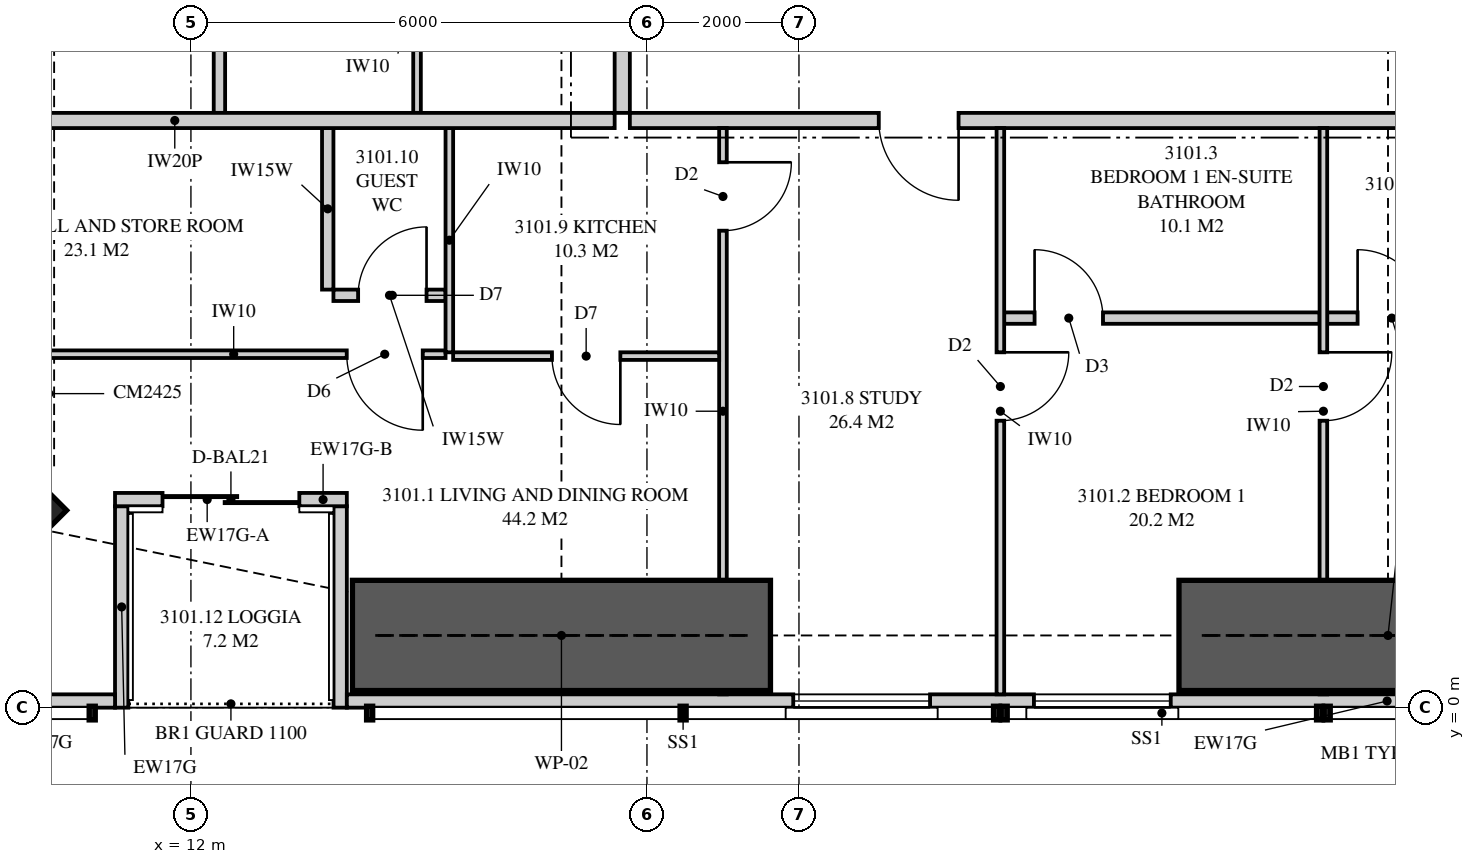
"""IFC4 building model, lengths in metres.
Left out: names, types, materials, properties, quantities, classifications, styles, units other than length and angle.
Written with IfcOpenShell. Run it as: python <this file> out.ifc"""

import sys

from ifc_helpers import new_model, si_unit, direction, frame, frame_2d, origin, origin_2d, place, context, subcontext, project, spatial, polyline, rectangle, outline, extrude, element, fill, save


model = new_model("IFC4")
c1 = context("Model", 3, precision=1e-05, world=origin(), true_north=direction((0.0, 1.0)))
c2 = subcontext(c1, "Body", "Model", "MODEL_VIEW")
j1 = project(units=[si_unit("LENGTHUNIT", "METRE"), si_unit("PLANEANGLEUNIT", "RADIAN")], contexts=[c1])
p1 = place(None, origin())
s1 = spatial("IfcSite", under=j1, at=p1, CompositionType="ELEMENT")
p2 = place(p1, origin())
s2 = spatial("IfcBuilding", under=s1, at=p2, CompositionType="ELEMENT")
p3 = place(p2, frame((0.0, 0.0, 114.9)))
s3 = spatial("IfcBuildingStorey", under=s2, at=p3, CompositionType="ELEMENT", Elevation=114.9)
p4 = place(p3, frame((8.631, 2.631, 0.0), z_axis=(0.0, 0.0, 1.0), x_axis=(0.707106781187, 0.707106781187, 0.0)))
e1 = element("IfcColumn", 1, at=p4, inside=s3, PredefinedType="COLUMN", context=c2, shape_type="SweptSolid", body=[
    extrude(rectangle(XDim=2.4, YDim=2.5, at=origin_2d()), origin(), (0.0, 0.0, 1.0), 3.35),
])
p5 = place(p3, frame((9.051, 0.087, 0.0), z_axis=(0.0, 0.0, 1.0), x_axis=(1.0, 0.0, 0.0)))
e2 = element("IfcWall", 2, at=p5, inside=s3, PredefinedType="SOLIDWALL", context=c2, shape_type="SweptSolid", body=[
    extrude(rectangle(XDim=1.95, YDim=0.175, at=frame_2d((0.975, 0.0))), origin(), (0.0, 0.0, 1.0), 3.11),
])
p6 = place(p3, frame((14.051, 0.087, 0.0), z_axis=(0.0, 0.0, 1.0), x_axis=(1.0, 0.0, 0.0)))
e3 = element("IfcWall", 3, at=p6, inside=s3, PredefinedType="SOLIDWALL", context=c2, shape_type="SweptSolid", body=[
    extrude(outline(polyline([(0.0, 0.0), (27.374, 0.0), (27.374, 3.11), (24.777, 3.11), (24.777, 2.15), (24.732, 2.15), (24.732, 3.11), (24.574, 3.11), (24.574, 2.15), (2.824, 2.15), (2.824, 3.11), (2.666, 3.11), (2.666, 2.15), (2.62, 2.15), (2.62, 3.11), (0.0, 3.11), (0.0, 0.0)])), frame((0.0, 0.087, 0.0), z_axis=(0.0, -1.0, 0.0), x_axis=(1.0, 0.0, 0.0)), (0.0, 0.0, 1.0), 0.175),
])
p7 = place(p6, frame((5.874, 0.0, 0.4)))
e4 = element("IfcOpeningElement", 4, at=p7, cuts=e3, PredefinedType="OPENING", context=c2, shape_type="SweptSolid", body=[
    extrude(rectangle(XDim=1.8, YDim=1.7, at=frame_2d((0.9, 0.85))), frame((0.0, 0.097, 0.0), z_axis=(0.0, -1.0, 0.0), x_axis=(1.0, 0.0, 0.0)), (0.0, 0.0, 1.0), 0.195),
])
p8 = place(p6, frame((9.04, 0.0, 0.4)))
e5 = element("IfcOpeningElement", 5, at=p8, cuts=e3, PredefinedType="OPENING", context=c2, shape_type="SweptSolid", body=[
    extrude(rectangle(XDim=1.8, YDim=1.7, at=frame_2d((0.9, 0.85))), frame((0.0, 0.097, 0.0), z_axis=(0.0, -1.0, 0.0), x_axis=(1.0, 0.0, 0.0)), (0.0, 0.0, 1.0), 0.195),
])
p9 = place(p6, frame((16.564, 0.0, 0.4)))
e6 = element("IfcOpeningElement", 6, at=p9, cuts=e3, PredefinedType="OPENING", context=c2, shape_type="SweptSolid", body=[
    extrude(rectangle(XDim=1.8, YDim=1.7, at=frame_2d((0.9, 0.85))), frame((0.0, 0.097, 0.0), z_axis=(0.0, -1.0, 0.0), x_axis=(1.0, 0.0, 0.0)), (0.0, 0.0, 1.0), 0.195),
])
p10 = place(p6, frame((19.889, 0.0, 0.4)))
e7 = element("IfcOpeningElement", 7, at=p10, cuts=e3, PredefinedType="OPENING", context=c2, shape_type="SweptSolid", body=[
    extrude(rectangle(XDim=1.8, YDim=1.7, at=frame_2d((0.9, 0.85))), frame((0.0, 0.097, 0.0), z_axis=(0.0, -1.0, 0.0), x_axis=(1.0, 0.0, 0.0)), (0.0, 0.0, 1.0), 0.195),
])
p11 = place(p3, frame((11.001, 2.738, 0.0), z_axis=(0.0, 0.0, 1.0), x_axis=(1.0, 0.0, 0.0)))
e8 = element("IfcWall", 8, at=p11, inside=s3, PredefinedType="SOLIDWALL", context=c2, shape_type="SweptSolid", body=[
    extrude(rectangle(XDim=2.425, YDim=0.175, at=frame_2d((1.212, 0.0))), origin(), (0.0, 0.0, 1.0), 2.15),
])
p12 = place(p11, frame((0.625, 0.0, 0.0)))
e9 = element("IfcOpeningElement", 9, at=p12, cuts=e8, PredefinedType="OPENING", context=c2, shape_type="SweptSolid", body=[
    extrude(rectangle(XDim=1.8, YDim=2.1, at=frame_2d((0.9, 1.05))), frame((0.0, 0.097, 0.0), z_axis=(0.0, -1.0, 0.0), x_axis=(1.0, 0.0, 0.0)), (0.0, 0.0, 1.0), 0.195),
])
p13 = place(p3, frame((13.426, 2.738, 0.0), z_axis=(0.0, 0.0, 1.0), x_axis=(1.0, 0.0, 0.0)))
e10 = element("IfcWall", 10, at=p13, inside=s3, PredefinedType="SOLIDWALL", context=c2, shape_type="SweptSolid", body=[
    extrude(rectangle(XDim=0.625, YDim=0.175, at=frame_2d((0.312, 0.0))), origin(), (0.0, 0.0, 1.0), 3.11),
])
p14 = place(p3, frame((11.089, 0.0, 0.0), z_axis=(0.0, 0.0, 1.0), x_axis=(0.0, 1.0, 0.0)))
e11 = element("IfcWall", 11, at=p14, inside=s3, PredefinedType="SOLIDWALL", context=c2, shape_type="SweptSolid", body=[
    extrude(outline(polyline([(0.0, 0.0), (2.65, 0.0), (2.65, 2.15), (1.296, 2.15), (1.296, 3.11), (0.0, 3.11), (0.0, 0.0)])), frame((0.0, 0.087, 0.0), z_axis=(0.0, -1.0, 0.0), x_axis=(1.0, 0.0, 0.0)), (0.0, 0.0, 1.0), 0.175),
])
p15 = place(p3, frame((13.964, 0.0, 0.0), z_axis=(0.0, 0.0, 1.0), x_axis=(0.0, 1.0, 0.0)))
e12 = element("IfcWall", 12, at=p15, inside=s3, PredefinedType="SOLIDWALL", context=c2, shape_type="SweptSolid", body=[
    extrude(outline(polyline([(0.0, 0.0), (2.65, 0.0), (2.65, 3.11), (2.378, 3.11), (2.378, 2.15), (0.709, 2.15), (0.709, 3.11), (0.0, 3.11), (0.0, 0.0)])), frame((0.0, 0.087, 0.0), z_axis=(0.0, -1.0, 0.0), x_axis=(1.0, 0.0, 0.0)), (0.0, 0.0, 1.0), 0.175),
])
p16 = place(p3, frame((17.775, 7.725, 0.0), z_axis=(0.0, 0.0, 1.0), x_axis=(1.0, 0.0, 0.0)))
e13 = element("IfcWall", 13, at=p16, inside=s3, PredefinedType="PARTITIONING", context=c2, shape_type="SweptSolid", body=[
    extrude(outline(polyline([(0.0, 0.0), (19.225, 0.0), (19.225, 3.11), (10.312, 3.11), (10.312, 2.541), (9.638, 2.541), (9.638, 3.11), (0.0, 3.11), (0.0, 0.0)])), frame((0.0, 0.1, 0.0), z_axis=(0.0, -1.0, 0.0), x_axis=(1.0, 0.0, 0.0)), (0.0, 0.0, 1.0), 0.2),
])
p17 = place(p16, frame((3.275, 0.0, 0.0)))
e14 = element("IfcOpeningElement", 14, at=p17, cuts=e13, PredefinedType="OPENING", context=c2, shape_type="SweptSolid", body=[
    extrude(rectangle(XDim=1.05, YDim=2.2, at=frame_2d((0.525, 1.1))), frame((0.0, 0.11, 0.0), z_axis=(0.0, -1.0, 0.0), x_axis=(1.0, 0.0, 0.0)), (0.0, 0.0, 1.0), 0.22),
])
p18 = place(p3, frame((22.65, 0.175, 0.0), z_axis=(0.0, 0.0, 1.0), x_axis=(0.0, 1.0, 0.0)))
e15 = element("IfcWall", 15, at=p18, inside=s3, PredefinedType="PARTITIONING", context=c2, shape_type="SweptSolid", body=[
    extrude(outline(polyline([(0.0, 0.0), (7.45, 0.0), (7.45, 3.11), (1.635, 3.11), (1.635, 2.15), (0.0, 2.15), (0.0, 3.11), (0.0, 0.0)])), frame((0.0, 0.05, 0.0), z_axis=(0.0, -1.0, 0.0), x_axis=(1.0, 0.0, 0.0)), (0.0, 0.0, 1.0), 0.1),
])
p19 = place(p18, frame((3.6, 0.0, 0.0)))
e16 = element("IfcOpeningElement", 16, at=p19, cuts=e15, PredefinedType="OPENING", context=c2, shape_type="SweptSolid", body=[
    extrude(rectangle(XDim=0.9, YDim=2.1, at=frame_2d((0.45, 1.05))), frame((0.0, 0.06, 0.0), z_axis=(0.0, -1.0, 0.0), x_axis=(1.0, 0.0, 0.0)), (0.0, 0.0, 1.0), 0.12),
])
p20 = place(p3, frame((26.9, 0.175, 0.0), z_axis=(0.0, 0.0, 1.0), x_axis=(0.0, 1.0, 0.0)))
e17 = element("IfcWall", 17, at=p20, inside=s3, PredefinedType="PARTITIONING", context=c2, shape_type="SweptSolid", body=[
    extrude(outline(polyline([(0.529, 2.15), (0.0, 2.15), (0.0, 0.0), (0.529, 0.0), (0.529, 0.889), (1.021, 0.889), (1.021, 0.0), (7.45, 0.0), (7.45, 3.11), (1.635, 3.11), (1.635, 2.15), (1.021, 2.15), (1.021, 1.261), (0.529, 1.261), (0.529, 2.15)])), frame((0.0, 0.05, 0.0), z_axis=(0.0, -1.0, 0.0), x_axis=(1.0, 0.0, 0.0)), (0.0, 0.0, 1.0), 0.1),
])
p21 = place(p20, frame((3.6, 0.0, 0.0)))
e18 = element("IfcOpeningElement", 18, at=p21, cuts=e17, PredefinedType="OPENING", context=c2, shape_type="SweptSolid", body=[
    extrude(rectangle(XDim=0.9, YDim=2.1, at=frame_2d((0.45, 1.05))), frame((0.0, 0.06, 0.0), z_axis=(0.0, -1.0, 0.0), x_axis=(1.0, 0.0, 0.0)), (0.0, 0.0, 1.0), 0.12),
])
p22 = place(p3, frame((22.7, 5.125, 0.0), z_axis=(0.0, 0.0, 1.0), x_axis=(1.0, 0.0, 0.0)))
e19 = element("IfcWall", 19, at=p22, inside=s3, PredefinedType="PLUMBINGWALL", context=c2, shape_type="SweptSolid", body=[
    extrude(rectangle(XDim=4.15, YDim=0.15, at=frame_2d((2.075, 0.0))), origin(), (0.0, 0.0, 1.0), 3.11),
])
p23 = place(p22, frame((0.4, 0.0, 0.0)))
e20 = element("IfcOpeningElement", 20, at=p23, cuts=e19, PredefinedType="OPENING", context=c2, shape_type="SweptSolid", body=[
    extrude(rectangle(XDim=0.9, YDim=2.1, at=frame_2d((0.45, 1.05))), frame((0.0, 0.085, 0.0), z_axis=(0.0, -1.0, 0.0), x_axis=(1.0, 0.0, 0.0)), (0.0, 0.0, 1.0), 0.17),
])
p24 = place(p3, frame((26.95, 5.125, 0.0), z_axis=(0.0, 0.0, 1.0), x_axis=(1.0, 0.0, 0.0)))
e21 = element("IfcWall", 21, at=p24, inside=s3, PredefinedType="PLUMBINGWALL", context=c2, shape_type="SweptSolid", body=[
    extrude(outline(polyline([(0.0, 0.0), (5.9, 0.0), (5.9, 3.11), (1.112, 3.11), (1.112, 2.541), (0.488, 2.541), (0.488, 3.11), (0.0, 3.11), (0.0, 0.0)])), frame((0.0, 0.075, 0.0), z_axis=(0.0, -1.0, 0.0), x_axis=(1.0, 0.0, 0.0)), (0.0, 0.0, 1.0), 0.15),
])
p25 = place(p24, frame((0.4, 0.0, 0.0)))
e22 = element("IfcOpeningElement", 22, at=p25, cuts=e21, PredefinedType="OPENING", context=c2, shape_type="SweptSolid", body=[
    extrude(rectangle(XDim=0.9, YDim=2.1, at=frame_2d((0.45, 1.05))), frame((0.0, 0.085, 0.0), z_axis=(0.0, -1.0, 0.0), x_axis=(1.0, 0.0, 0.0)), (0.0, 0.0, 1.0), 0.17),
])
p26 = place(p3, frame((19.0, 0.175, 0.0), z_axis=(0.0, 0.0, 1.0), x_axis=(0.0, 1.0, 0.0)))
e23 = element("IfcWall", 23, at=p26, inside=s3, PredefinedType="PARTITIONING", context=c2, shape_type="SweptSolid", body=[
    extrude(outline(polyline([(0.529, 2.15), (0.0, 2.15), (0.0, 0.0), (0.529, 0.0), (0.529, 0.017), (1.021, 0.017), (1.021, 0.0), (7.45, 0.0), (7.45, 3.11), (1.635, 3.11), (1.635, 2.15), (1.021, 2.15), (1.021, 2.133), (0.529, 2.133), (0.529, 2.15)])), frame((0.0, 0.05, 0.0), z_axis=(0.0, -1.0, 0.0), x_axis=(1.0, 0.0, 0.0)), (0.0, 0.0, 1.0), 0.1),
])
p27 = place(p26, frame((6.1, 0.0, 0.0)))
e24 = element("IfcOpeningElement", 24, at=p27, cuts=e23, PredefinedType="OPENING", context=c2, shape_type="SweptSolid", body=[
    extrude(rectangle(XDim=0.9, YDim=2.1, at=frame_2d((0.45, 1.05))), frame((0.0, 0.06, 0.0), z_axis=(0.0, -1.0, 0.0), x_axis=(1.0, 0.0, 0.0)), (0.0, 0.0, 1.0), 0.12),
])
p28 = place(p3, frame((15.45, 4.625, 0.0), z_axis=(0.0, 0.0, 1.0), x_axis=(1.0, 0.0, 0.0)))
e25 = element("IfcWall", 25, at=p28, inside=s3, PredefinedType="PARTITIONING", context=c2, shape_type="SweptSolid", body=[
    extrude(outline(polyline([(0.0, 0.0), (3.5, 0.0), (3.5, 3.11), (1.712, 3.11), (1.712, 2.541), (1.138, 2.541), (1.138, 3.11), (0.0, 3.11), (0.0, 0.0)])), frame((0.0, 0.05, 0.0), z_axis=(0.0, -1.0, 0.0), x_axis=(1.0, 0.0, 0.0)), (0.0, 0.0, 1.0), 0.1),
])
p29 = place(p28, frame((1.3, 0.0, 0.0)))
e26 = element("IfcOpeningElement", 26, at=p29, cuts=e25, PredefinedType="OPENING", context=c2, shape_type="SweptSolid", body=[
    extrude(rectangle(XDim=0.9, YDim=2.1, at=frame_2d((0.45, 1.05))), frame((0.0, 0.06, 0.0), z_axis=(0.0, -1.0, 0.0), x_axis=(1.0, 0.0, 0.0)), (0.0, 0.0, 1.0), 0.12),
])
p30 = place(p3, frame((15.4, 4.675, 0.0), z_axis=(0.0, 0.0, 1.0), x_axis=(0.0, 1.0, 0.0)))
e27 = element("IfcWall", 27, at=p30, inside=s3, PredefinedType="PARTITIONING", context=c2, shape_type="SweptSolid", body=[
    extrude(rectangle(XDim=2.95, YDim=0.1, at=frame_2d((1.475, 0.0))), origin(), (0.0, 0.0, 1.0), 3.11),
])
p31 = place(p3, frame((13.875, 5.425, 0.0), z_axis=(0.0, 0.0, 1.0), x_axis=(1.0, 0.0, 0.0)))
e28 = element("IfcWall", 28, at=p31, inside=s3, PredefinedType="PLUMBINGWALL", context=c2, shape_type="SweptSolid", body=[
    extrude(rectangle(XDim=1.475, YDim=0.15, at=frame_2d((0.738, 0.0))), origin(), (0.0, 0.0, 1.0), 3.11),
])
p32 = place(p31, frame((0.325, 0.0, 0.0)))
e29 = element("IfcOpeningElement", 29, at=p32, cuts=e28, PredefinedType="OPENING", context=c2, shape_type="SweptSolid", body=[
    extrude(rectangle(XDim=0.9, YDim=2.1, at=frame_2d((0.45, 1.05))), frame((0.0, 0.085, 0.0), z_axis=(0.0, -1.0, 0.0), x_axis=(1.0, 0.0, 0.0)), (0.0, 0.0, 1.0), 0.17),
])
p33 = place(p3, frame((13.8, 5.5, 0.0), z_axis=(0.0, 0.0, 1.0), x_axis=(0.0, 1.0, 0.0)))
e30 = element("IfcWall", 30, at=p33, inside=s3, PredefinedType="PLUMBINGWALL", context=c2, shape_type="SweptSolid", body=[
    extrude(rectangle(XDim=2.125, YDim=0.15, at=frame_2d((1.062, 0.0))), origin(), (0.0, 0.0, 1.0), 3.11),
])
p34 = place(p3, frame((6.175, 4.65, 0.0), z_axis=(0.0, 0.0, 1.0), x_axis=(1.0, 0.0, 0.0)))
e31 = element("IfcWall", 31, at=p34, inside=s3, PredefinedType="PARTITIONING", context=c2, shape_type="SweptSolid", body=[
    extrude(outline(polyline([(0.0, 0.0), (9.175, 0.0), (9.175, 3.11), (5.285, 3.11), (5.285, 2.51), (3.0, 2.51), (3.0, 2.15), (1.258, 2.15), (1.258, 3.11), (0.0, 3.11), (0.0, 0.0)])), frame((0.0, 0.05, 0.0), z_axis=(0.0, -1.0, 0.0), x_axis=(1.0, 0.0, 0.0)), (0.0, 0.0, 1.0), 0.1),
])
p35 = place(p34, frame((7.875, 0.0, 0.0)))
e32 = element("IfcOpeningElement", 32, at=p35, cuts=e31, PredefinedType="OPENING", context=c2, shape_type="SweptSolid", body=[
    extrude(rectangle(XDim=1.0, YDim=2.1, at=frame_2d((0.5, 1.05))), frame((0.0, 0.06, 0.0), z_axis=(0.0, -1.0, 0.0), x_axis=(1.0, 0.0, 0.0)), (0.0, 0.0, 1.0), 0.12),
])
p36 = place(p3, frame((6.0, 7.725, 0.0), z_axis=(0.0, 0.0, 1.0), x_axis=(1.0, 0.0, 0.0)))
e33 = element("IfcWall", 33, at=p36, inside=s3, PredefinedType="PARTITIONING", context=c2, shape_type="SweptSolid", body=[
    extrude(outline(polyline([(0.0, 0.0), (11.575, 0.0), (11.575, 3.11), (11.212, 3.11), (11.212, 2.541), (10.538, 2.541), (10.538, 3.11), (5.51, 3.11), (5.51, 2.51), (2.969, 2.51), (2.969, 2.541), (2.727, 2.541), (2.727, 2.15), (0.884, 2.15), (0.884, 3.11), (0.0, 3.11), (0.0, 0.0)])), frame((0.0, 0.1, 0.0), z_axis=(0.0, -1.0, 0.0), x_axis=(1.0, 0.0, 0.0)), (0.0, 0.0, 1.0), 0.2),
])
p37 = place(p3, frame((17.675, 7.825, 0.0), z_axis=(0.0, 0.0, 1.0), x_axis=(0.0, 1.0, 0.0)))
e34 = element("IfcWall", 34, at=p37, inside=s3, PredefinedType="PARTITIONING", context=c2, shape_type="SweptSolid", body=[
    extrude(outline(polyline([(0.0, 0.0), (9.075, 0.0), (9.075, 3.11), (3.087, 3.11), (3.087, 2.541), (2.413, 2.541), (2.413, 3.11), (0.0, 3.11), (0.0, 0.0)])), frame((0.0, 0.1, 0.0), z_axis=(0.0, -1.0, 0.0), x_axis=(1.0, 0.0, 0.0)), (0.0, 0.0, 1.0), 0.2),
])
p38 = place(p3, frame((12.375, 7.825, 0.0), z_axis=(0.0, 0.0, 1.0), x_axis=(0.0, 1.0, 0.0)))
e35 = element("IfcWall", 35, at=p38, inside=s3, PredefinedType="PLUMBINGWALL", context=c2, shape_type="SweptSolid", body=[
    extrude(outline(polyline([(0.0, 0.0), (3.45, 0.0), (3.45, 3.11), (3.062, 3.11), (3.062, 2.541), (2.438, 2.541), (2.438, 3.11), (0.0, 3.11), (0.0, 0.0)])), frame((0.0, 0.075, 0.0), z_axis=(0.0, -1.0, 0.0), x_axis=(1.0, 0.0, 0.0)), (0.0, 0.0, 1.0), 0.15),
])
p39 = place(p3, frame((14.975, 7.825, 0.0), z_axis=(0.0, 0.0, 1.0), x_axis=(0.0, 1.0, 0.0)))
e36 = element("IfcWall", 36, at=p39, inside=s3, PredefinedType="PARTITIONING", context=c2, shape_type="SweptSolid", body=[
    extrude(outline(polyline([(0.0, 0.0), (3.45, 0.0), (3.45, 3.11), (3.037, 3.11), (3.037, 2.541), (2.463, 2.541), (2.463, 3.11), (0.0, 3.11), (0.0, 0.0)])), frame((0.0, 0.05, 0.0), z_axis=(0.0, -1.0, 0.0), x_axis=(1.0, 0.0, 0.0)), (0.0, 0.0, 1.0), 0.1),
])
for number, where, z_axis, x_axis in (
    (37, (14.125, 0.95, 0.0), (0.0, 0.0, 1.0), (1.0, 0.0, 0.0)),
    (38, (25.0, 0.95, 0.0), (0.0, 0.0, 1.0), (1.0, 0.0, 0.0)),
):
    element("IfcWall", number, at=place(p3, frame(where, z_axis=z_axis, x_axis=x_axis)), inside=s3, PredefinedType="SHEAR", context=c2, shape_type="SweptSolid", body=[
        extrude(rectangle(XDim=5.5, YDim=1.45, at=frame_2d((2.75, 0.0))), origin(), (0.0, 0.0, 1.0), 3.35),
    ])
p40 = place(p12, origin())
e39 = element("IfcDoor", 39, at=p40, inside=s3, OperationType="SLIDING_TO_LEFT", PredefinedType="DOOR", context=c2, shape_type="SweptSolid", body=[
    extrude(rectangle(XDim=1.8, YDim=2.1, at=frame_2d((0.9, 1.05))), frame((0.0, 0.025, 0.0), z_axis=(0.0, -1.0, 0.0), x_axis=(1.0, 0.0, 0.0)), (0.0, 0.0, 1.0), 0.05),
])
fill(e9, e39)
p41 = place(p7, origin())
e40 = element("IfcWindow", 40, at=p41, inside=s3, PartitioningType="SINGLE_PANEL", PredefinedType="WINDOW", context=c2, shape_type="SweptSolid", body=[
    extrude(rectangle(XDim=1.8, YDim=1.7, at=frame_2d((0.9, 0.85))), frame((0.0, 0.03, 0.0), z_axis=(0.0, -1.0, 0.0), x_axis=(1.0, 0.0, 0.0)), (0.0, 0.0, 1.0), 0.06),
])
fill(e4, e40)
p42 = place(p8, origin())
e41 = element("IfcWindow", 41, at=p42, inside=s3, PartitioningType="SINGLE_PANEL", PredefinedType="WINDOW", context=c2, shape_type="SweptSolid", body=[
    extrude(rectangle(XDim=1.8, YDim=1.7, at=frame_2d((0.9, 0.85))), frame((0.0, 0.03, 0.0), z_axis=(0.0, -1.0, 0.0), x_axis=(1.0, 0.0, 0.0)), (0.0, 0.0, 1.0), 0.06),
])
fill(e5, e41)
p43 = place(p17, frame((1.05, 0.0, 0.0), z_axis=(0.0, 0.0, 1.0), x_axis=(-1.0, 0.0, 0.0)))
e42 = element("IfcDoor", 42, at=p43, inside=s3, OperationType="SINGLE_SWING_LEFT", PredefinedType="DOOR", context=c2, shape_type="SweptSolid", body=[
    extrude(rectangle(XDim=1.05, YDim=2.2, at=frame_2d((0.525, 1.1))), frame((0.0, 0.025, 0.0), z_axis=(0.0, -1.0, 0.0), x_axis=(1.0, 0.0, 0.0)), (0.0, 0.0, 1.0), 0.05),
])
fill(e14, e42)
p44 = place(p19, frame((0.9, 0.0, 0.0), z_axis=(0.0, 0.0, 1.0), x_axis=(-1.0, 0.0, 0.0)))
e43 = element("IfcDoor", 43, at=p44, inside=s3, OperationType="SINGLE_SWING_LEFT", PredefinedType="DOOR", context=c2, shape_type="SweptSolid", body=[
    extrude(rectangle(XDim=0.9, YDim=2.1, at=frame_2d((0.45, 1.05))), frame((0.0, 0.025, 0.0), z_axis=(0.0, -1.0, 0.0), x_axis=(1.0, 0.0, 0.0)), (0.0, 0.0, 1.0), 0.05),
])
fill(e16, e43)
p45 = place(p23, origin())
e44 = element("IfcDoor", 44, at=p45, inside=s3, OperationType="SINGLE_SWING_LEFT", PredefinedType="DOOR", context=c2, shape_type="SweptSolid", body=[
    extrude(rectangle(XDim=0.9, YDim=2.1, at=frame_2d((0.45, 1.05))), frame((0.0, 0.025, 0.0), z_axis=(0.0, -1.0, 0.0), x_axis=(1.0, 0.0, 0.0)), (0.0, 0.0, 1.0), 0.05),
])
fill(e20, e44)
p46 = place(p21, frame((0.9, 0.0, 0.0), z_axis=(0.0, 0.0, 1.0), x_axis=(-1.0, 0.0, 0.0)))
e45 = element("IfcDoor", 45, at=p46, inside=s3, OperationType="SINGLE_SWING_LEFT", PredefinedType="DOOR", context=c2, shape_type="SweptSolid", body=[
    extrude(rectangle(XDim=0.9, YDim=2.1, at=frame_2d((0.45, 1.05))), frame((0.0, 0.025, 0.0), z_axis=(0.0, -1.0, 0.0), x_axis=(1.0, 0.0, 0.0)), (0.0, 0.0, 1.0), 0.05),
])
fill(e18, e45)
p47 = place(p25, origin())
e46 = element("IfcDoor", 46, at=p47, inside=s3, OperationType="SINGLE_SWING_LEFT", PredefinedType="DOOR", context=c2, shape_type="SweptSolid", body=[
    extrude(rectangle(XDim=0.9, YDim=2.1, at=frame_2d((0.45, 1.05))), frame((0.0, 0.025, 0.0), z_axis=(0.0, -1.0, 0.0), x_axis=(1.0, 0.0, 0.0)), (0.0, 0.0, 1.0), 0.05),
])
fill(e22, e46)
p48 = place(p27, frame((0.9, 0.0, 0.0), z_axis=(0.0, 0.0, 1.0), x_axis=(-1.0, 0.0, 0.0)))
e47 = element("IfcDoor", 47, at=p48, inside=s3, OperationType="SINGLE_SWING_LEFT", PredefinedType="DOOR", context=c2, shape_type="SweptSolid", body=[
    extrude(rectangle(XDim=0.9, YDim=2.1, at=frame_2d((0.45, 1.05))), frame((0.0, 0.025, 0.0), z_axis=(0.0, -1.0, 0.0), x_axis=(1.0, 0.0, 0.0)), (0.0, 0.0, 1.0), 0.05),
])
fill(e24, e47)
p49 = place(p29, frame((0.9, 0.0, 0.0), z_axis=(0.0, 0.0, 1.0), x_axis=(-1.0, 0.0, 0.0)))
e48 = element("IfcDoor", 48, at=p49, inside=s3, OperationType="SINGLE_SWING_LEFT", PredefinedType="DOOR", context=c2, shape_type="SweptSolid", body=[
    extrude(rectangle(XDim=0.9, YDim=2.1, at=frame_2d((0.45, 1.05))), frame((0.0, 0.025, 0.0), z_axis=(0.0, -1.0, 0.0), x_axis=(1.0, 0.0, 0.0)), (0.0, 0.0, 1.0), 0.05),
])
fill(e26, e48)
p50 = place(p32, origin())
e49 = element("IfcDoor", 49, at=p50, inside=s3, OperationType="SINGLE_SWING_RIGHT", PredefinedType="DOOR", context=c2, shape_type="SweptSolid", body=[
    extrude(rectangle(XDim=0.9, YDim=2.1, at=frame_2d((0.45, 1.05))), frame((0.0, 0.025, 0.0), z_axis=(0.0, -1.0, 0.0), x_axis=(1.0, 0.0, 0.0)), (0.0, 0.0, 1.0), 0.05),
])
fill(e29, e49)
p51 = place(p35, frame((1.0, 0.0, 0.0), z_axis=(0.0, 0.0, 1.0), x_axis=(-1.0, 0.0, 0.0)))
e50 = element("IfcDoor", 50, at=p51, inside=s3, OperationType="SINGLE_SWING_LEFT", PredefinedType="DOOR", context=c2, shape_type="SweptSolid", body=[
    extrude(rectangle(XDim=1.0, YDim=2.1, at=frame_2d((0.5, 1.05))), frame((0.0, 0.025, 0.0), z_axis=(0.0, -1.0, 0.0), x_axis=(1.0, 0.0, 0.0)), (0.0, 0.0, 1.0), 0.05),
])
fill(e32, e50)
save(model, sys.argv[1])
